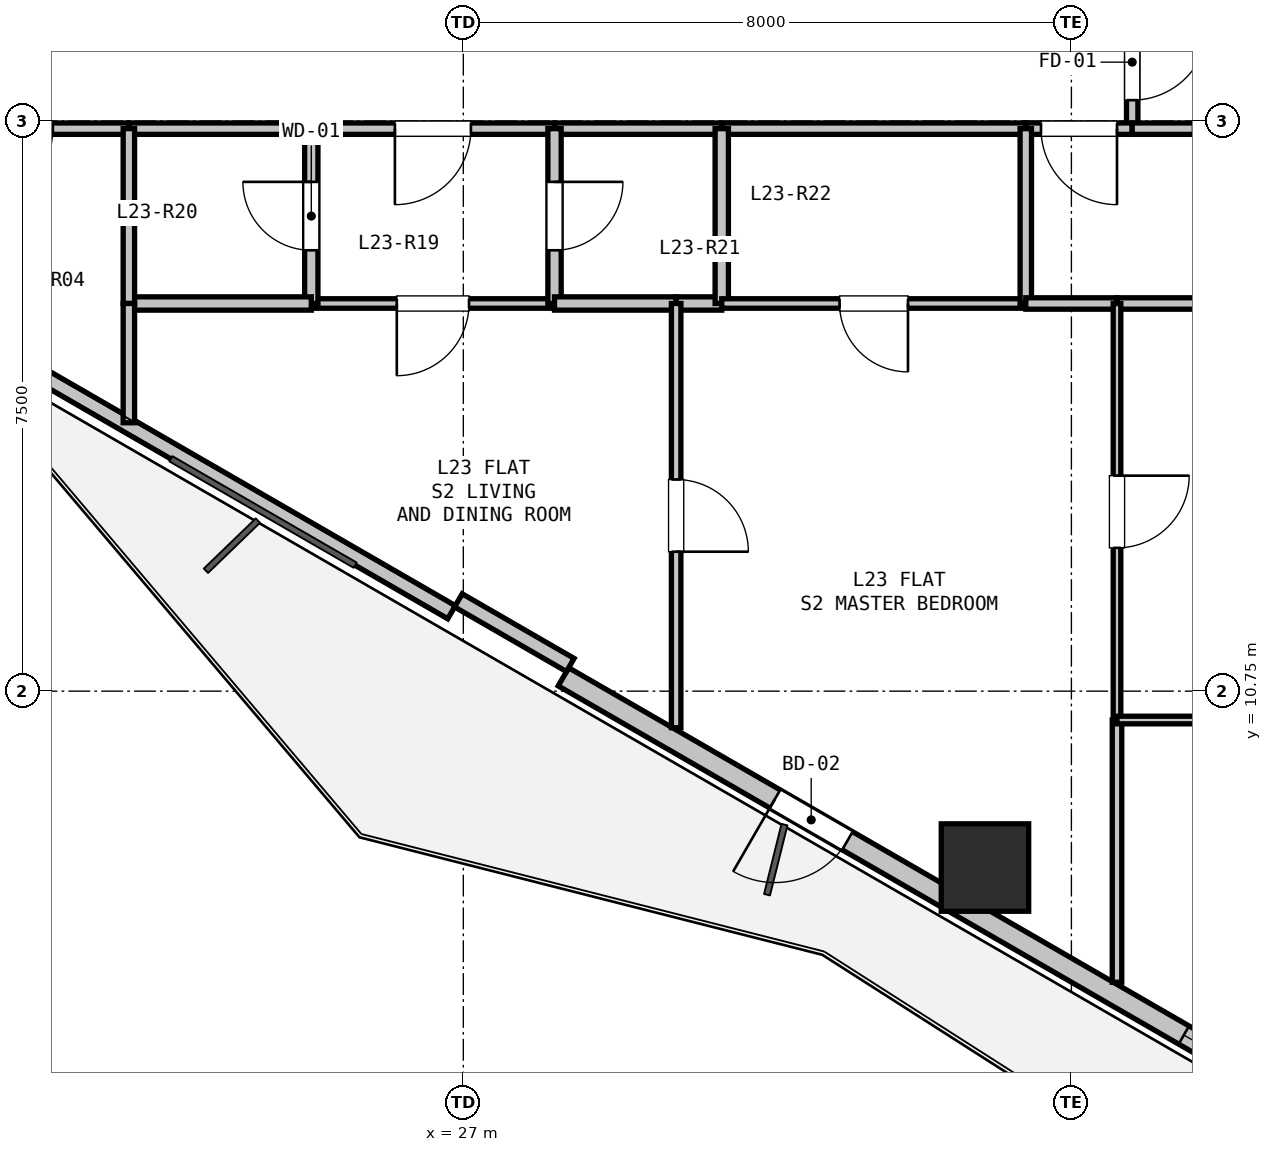
"""IFC4 building model, lengths in metres.
Left out: names, types, materials, properties, quantities, classifications, styles, units other than length and angle.
Written with IfcOpenShell. Run it as: python <this file> out.ifc"""

import sys

from ifc_helpers import new_model, si_unit, direction, frame, frame_2d, origin, origin_2d, place, context, subcontext, project, spatial, rectangle, hollow_rectangle, extrude, element, fill, save


model = new_model("IFC4")
c1 = context("Model", 3, precision=1e-05, world=origin(), true_north=direction((0.0, 1.0)))
c2 = subcontext(c1, "Body", "Model", "MODEL_VIEW")
j1 = project(units=[si_unit("LENGTHUNIT", "METRE"), si_unit("PLANEANGLEUNIT", "RADIAN")], contexts=[c1])
p1 = place(None, origin())
s1 = spatial("IfcSite", under=j1, at=p1, CompositionType="ELEMENT")
p2 = place(p1, origin())
s2 = spatial("IfcBuilding", under=s1, at=p2, CompositionType="ELEMENT")
p3 = place(p2, frame((0.0, 0.0, 86.7)))
s3 = spatial("IfcBuildingStorey", under=s2, at=p3, CompositionType="ELEMENT", Elevation=86.7)
p4 = place(p3, frame((33.863, 8.429, 0.0), z_axis=(0.0, 0.0, 1.0), x_axis=(1.0, 0.0, 0.0)))
e1 = element("IfcColumn", 1, at=p4, inside=s3, PredefinedType="COLUMN", context=c2, shape_type="SweptSolid", body=[
    extrude(hollow_rectangle(XDim=1.15, YDim=1.15, WallThickness=0.032, at=origin_2d()), origin(), (0.0, 0.0, 1.0), 3.3),
])
p5 = place(p3, frame((38.649, 4.973, 0.0), z_axis=(0.0, 0.0, 1.0), x_axis=(-0.866023023012, 0.500004123596, 0.0)))
e2 = element("IfcWall", 2, at=p5, inside=s3, PredefinedType="SOLIDWALL", context=c2, shape_type="SweptSolid", body=[
    extrude(rectangle(XDim=11.93, YDim=0.275, at=frame_2d((5.965, 0.0))), origin(), (0.0, 0.0, 1.0), 2.67),
])
p6 = place(p5, frame((7.616, 0.0, 0.0)))
e3 = element("IfcOpeningElement", 3, at=p6, cuts=e2, PredefinedType="OPENING", context=c2, shape_type="SweptSolid", body=[
    extrude(rectangle(XDim=1.1, YDim=2.1, at=frame_2d((0.55, 1.05))), frame((0.0, 0.147, 0.0), z_axis=(0.0, -1.0, 0.0), x_axis=(1.0, 0.0, 0.0)), (0.0, 0.0, 1.0), 0.295),
])
p7 = place(p5, frame((1.305, 0.0, 0.9)))
e4 = element("IfcOpeningElement", 4, at=p7, cuts=e2, PredefinedType="OPENING", context=c2, shape_type="SweptSolid", body=[
    extrude(rectangle(XDim=1.2, YDim=1.4, at=frame_2d((0.6, 0.7))), frame((0.0, 0.147, 0.0), z_axis=(0.0, -1.0, 0.0), x_axis=(1.0, 0.0, 0.0)), (0.0, 0.0, 1.0), 0.295),
])
p8 = place(p3, frame((26.845, 11.788, 0.0), z_axis=(0.0, 0.0, 1.0), x_axis=(-0.866027010039, 0.499997217876, 0.0)))
e5 = element("IfcWall", 5, at=p8, inside=s3, PredefinedType="PARAPET", context=c2, shape_type="SweptSolid", body=[
    extrude(rectangle(XDim=11.229, YDim=0.2, at=frame_2d((5.615, 0.0))), origin(), (0.0, 0.0, 1.0), 0.2),
])
p9 = place(p3, frame((28.407, 11.094, 0.0), z_axis=(0.0, 0.0, 1.0), x_axis=(-0.86605165483, 0.499954529098, 0.0)))
e6 = element("IfcWall", 6, at=p9, inside=s3, PredefinedType="PARAPET", context=c2, shape_type="SweptSolid", body=[
    extrude(rectangle(XDim=1.7, YDim=0.2, at=frame_2d((0.85, 0.0))), origin(), (0.0, 0.0, 1.0), 2.67),
])
p10 = place(p3, frame((35.8, 19.9, 0.0), z_axis=(0.0, 0.0, 1.0), x_axis=(0.0, -1.0, 0.0)))
e7 = element("IfcWall", 7, at=p10, inside=s3, PredefinedType="PARTITIONING", context=c2, shape_type="SweptSolid", body=[
    extrude(rectangle(XDim=1.75, YDim=0.15, at=frame_2d((0.875, 0.0))), origin(), (0.0, 0.0, 1.0), 3.05),
])
p11 = place(p10, frame((0.375, 0.0, 0.0)))
e8 = element("IfcOpeningElement", 8, at=p11, cuts=e7, PredefinedType="OPENING", context=c2, shape_type="SweptSolid", body=[
    extrude(rectangle(XDim=1.0, YDim=2.15, at=frame_2d((0.5, 1.075))), frame((0.0, 0.085, 0.0), z_axis=(0.0, -1.0, 0.0), x_axis=(1.0, 0.0, 0.0)), (0.0, 0.0, 1.0), 0.17),
])
p12 = place(p3, frame((35.8, 18.15, 0.0), z_axis=(0.0, 0.0, 1.0), x_axis=(-1.0, 0.0, 0.0)))
e9 = element("IfcWall", 9, at=p12, inside=s3, PredefinedType="PARTITIONING", context=c2, shape_type="SweptSolid", body=[
    extrude(rectangle(XDim=1.4, YDim=0.15, at=frame_2d((0.7, 0.0))), origin(), (0.0, 0.0, 1.0), 3.05),
])
p13 = place(p12, frame((0.2, 0.0, 0.0)))
e10 = element("IfcOpeningElement", 10, at=p13, cuts=e9, PredefinedType="OPENING", context=c2, shape_type="SweptSolid", body=[
    extrude(rectangle(XDim=1.0, YDim=2.15, at=frame_2d((0.5, 1.075))), frame((0.0, 0.085, 0.0), z_axis=(0.0, -1.0, 0.0), x_axis=(1.0, 0.0, 0.0)), (0.0, 0.0, 1.0), 0.17),
])
p14 = place(p3, frame((34.4, 18.15, 0.0), z_axis=(0.0, 0.0, 1.0), x_axis=(-1.0, 0.0, 0.0)))
e11 = element("IfcWall", 11, at=p14, inside=s3, PredefinedType="PARTITIONING", context=c2, shape_type="SweptSolid", body=[
    extrude(rectangle(XDim=4.0, YDim=0.15, at=frame_2d((2.0, 0.0))), origin(), (0.0, 0.0, 1.0), 3.05),
])
p15 = place(p3, frame((30.4, 18.15, 0.0), z_axis=(0.0, 0.0, 1.0), x_axis=(-1.0, 0.0, 0.0)))
e12 = element("IfcWall", 12, at=p15, inside=s3, PredefinedType="PARTITIONING", context=c2, shape_type="SweptSolid", body=[
    extrude(rectangle(XDim=2.2, YDim=0.15, at=frame_2d((1.1, 0.0))), origin(), (0.0, 0.0, 1.0), 3.05),
])
p16 = place(p3, frame((28.2, 18.15, 0.0), z_axis=(0.0, 0.0, 1.0), x_axis=(-1.0, 0.0, 0.0)))
e13 = element("IfcWall", 13, at=p16, inside=s3, PredefinedType="PARTITIONING", context=c2, shape_type="SweptSolid", body=[
    extrude(rectangle(XDim=3.2, YDim=0.15, at=frame_2d((1.6, 0.0))), origin(), (0.0, 0.0, 1.0), 3.05),
])
p17 = place(p16, frame((1.1, 0.0, 0.0)))
e14 = element("IfcOpeningElement", 14, at=p17, cuts=e13, PredefinedType="OPENING", context=c2, shape_type="SweptSolid", body=[
    extrude(rectangle(XDim=1.0, YDim=2.15, at=frame_2d((0.5, 1.075))), frame((0.0, 0.085, 0.0), z_axis=(0.0, -1.0, 0.0), x_axis=(1.0, 0.0, 0.0)), (0.0, 0.0, 1.0), 0.17),
])
p18 = place(p3, frame((25.0, 18.15, 0.0), z_axis=(0.0, 0.0, 1.0), x_axis=(-1.0, 0.0, 0.0)))
e15 = element("IfcWall", 15, at=p18, inside=s3, PredefinedType="PARTITIONING", context=c2, shape_type="SweptSolid", body=[
    extrude(rectangle(XDim=2.4, YDim=0.15, at=frame_2d((1.2, 0.0))), origin(), (0.0, 0.0, 1.0), 2.423),
])
p19 = place(p3, frame((22.6, 18.15, 0.0), z_axis=(0.0, 0.0, 1.0), x_axis=(-1.0, 0.0, 0.0)))
e16 = element("IfcWall", 16, at=p19, inside=s3, PredefinedType="PARTITIONING", context=c2, shape_type="SweptSolid", body=[
    extrude(rectangle(XDim=3.0, YDim=0.15, at=frame_2d((1.5, 0.0))), origin(), (0.0, 0.0, 1.0), 3.05),
])
p20 = place(p19, frame((1.0, 0.0, 0.0)))
e17 = element("IfcOpeningElement", 17, at=p20, cuts=e16, PredefinedType="OPENING", context=c2, shape_type="SweptSolid", body=[
    extrude(rectangle(XDim=1.0, YDim=2.15, at=frame_2d((0.5, 1.075))), frame((0.0, 0.085, 0.0), z_axis=(0.0, -1.0, 0.0), x_axis=(1.0, 0.0, 0.0)), (0.0, 0.0, 1.0), 0.17),
])
p21 = place(p3, frame((38.4, 18.15, 0.0), z_axis=(0.0, 0.0, 1.0), x_axis=(-1.0, 0.0, 0.0)))
e18 = element("IfcWall", 18, at=p21, inside=s3, PredefinedType="PARTITIONING", context=c2, shape_type="SweptSolid", body=[
    extrude(rectangle(XDim=2.6, YDim=0.15, at=frame_2d((1.3, 0.0))), origin(), (0.0, 0.0, 1.0), 2.423),
])
p22 = place(p21, frame((0.8, 0.0, 0.0)))
e19 = element("IfcOpeningElement", 19, at=p22, cuts=e18, PredefinedType="OPENING", context=c2, shape_type="SweptSolid", body=[
    extrude(rectangle(XDim=1.0, YDim=2.15, at=frame_2d((0.5, 1.075))), frame((0.0, 0.085, 0.0), z_axis=(0.0, -1.0, 0.0), x_axis=(1.0, 0.0, 0.0)), (0.0, 0.0, 1.0), 0.17),
])
p23 = place(p3, frame((28.2, 15.85, 0.0), z_axis=(0.0, 0.0, 1.0), x_axis=(-1.0, 0.0, 0.0)))
e20 = element("IfcWall", 20, at=p23, inside=s3, PredefinedType="PARTITIONING", context=c2, shape_type="SweptSolid", body=[
    extrude(rectangle(XDim=3.2, YDim=0.125, at=frame_2d((1.6, 0.0))), origin(), (0.0, 0.0, 1.0), 2.423),
])
p24 = place(p23, frame((1.125, 0.0, 0.0)))
e21 = element("IfcOpeningElement", 21, at=p24, cuts=e20, PredefinedType="OPENING", context=c2, shape_type="SweptSolid", body=[
    extrude(rectangle(XDim=0.95, YDim=2.1, at=frame_2d((0.475, 1.05))), frame((0.0, 0.073, 0.0), z_axis=(0.0, -1.0, 0.0), x_axis=(1.0, 0.0, 0.0)), (0.0, 0.0, 1.0), 0.145),
])
p25 = place(p3, frame((25.0, 15.85, 0.0), z_axis=(0.0, 0.0, 1.0), x_axis=(0.0, 1.0, 0.0)))
e22 = element("IfcWall", 22, at=p25, inside=s3, PredefinedType="PLUMBINGWALL", context=c2, shape_type="SweptSolid", body=[
    extrude(rectangle(XDim=2.3, YDim=0.175, at=frame_2d((1.15, 0.0))), origin(), (0.0, 0.0, 1.0), 2.423),
])
p26 = place(p25, frame((0.7, 0.0, 0.0)))
e23 = element("IfcOpeningElement", 23, at=p26, cuts=e22, PredefinedType="OPENING", context=c2, shape_type="SweptSolid", body=[
    extrude(rectangle(XDim=0.9, YDim=2.1, at=frame_2d((0.45, 1.05))), frame((0.0, 0.097, 0.0), z_axis=(0.0, -1.0, 0.0), x_axis=(1.0, 0.0, 0.0)), (0.0, 0.0, 1.0), 0.195),
])
p27 = place(p3, frame((28.2, 18.15, 0.0), z_axis=(0.0, 0.0, 1.0), x_axis=(0.0, -1.0, 0.0)))
e24 = element("IfcWall", 24, at=p27, inside=s3, PredefinedType="PLUMBINGWALL", context=c2, shape_type="SweptSolid", body=[
    extrude(rectangle(XDim=2.3, YDim=0.175, at=frame_2d((1.15, 0.0))), origin(), (0.0, 0.0, 1.0), 3.05),
])
p28 = place(p27, frame((0.7, 0.0, 0.0)))
e25 = element("IfcOpeningElement", 25, at=p28, cuts=e24, PredefinedType="OPENING", context=c2, shape_type="SweptSolid", body=[
    extrude(rectangle(XDim=0.9, YDim=2.1, at=frame_2d((0.45, 1.05))), frame((0.0, 0.097, 0.0), z_axis=(0.0, -1.0, 0.0), x_axis=(1.0, 0.0, 0.0)), (0.0, 0.0, 1.0), 0.195),
])
p29 = place(p3, frame((25.0, 15.85, 0.0), z_axis=(0.0, 0.0, 1.0), x_axis=(-1.0, 0.0, 0.0)))
e26 = element("IfcWall", 26, at=p29, inside=s3, PredefinedType="PLUMBINGWALL", context=c2, shape_type="SweptSolid", body=[
    extrude(rectangle(XDim=2.4, YDim=0.175, at=frame_2d((1.2, 0.0))), origin(), (0.0, 0.0, 1.0), 3.05),
])
p30 = place(p3, frame((22.6, 15.85, 0.0), z_axis=(0.0, 0.0, 1.0), x_axis=(0.0, 1.0, 0.0)))
e27 = element("IfcWall", 27, at=p30, inside=s3, PredefinedType="PARTITIONING", context=c2, shape_type="SweptSolid", body=[
    extrude(rectangle(XDim=2.3, YDim=0.15, at=frame_2d((1.15, 0.0))), origin(), (0.0, 0.0, 1.0), 3.05),
])
p31 = place(p3, frame((30.4, 15.85, 0.0), z_axis=(0.0, 0.0, 1.0), x_axis=(-1.0, 0.0, 0.0)))
e28 = element("IfcWall", 28, at=p31, inside=s3, PredefinedType="PLUMBINGWALL", context=c2, shape_type="SweptSolid", body=[
    extrude(rectangle(XDim=0.6, YDim=0.175, at=frame_2d((0.3, 0.0))), origin(), (0.0, 0.0, 1.0), 3.05),
])
p32 = place(p3, frame((29.8, 15.85, 0.0), z_axis=(0.0, 0.0, 1.0), x_axis=(-1.0, 0.0, 0.0)))
e29 = element("IfcWall", 29, at=p32, inside=s3, PredefinedType="PLUMBINGWALL", context=c2, shape_type="SweptSolid", body=[
    extrude(rectangle(XDim=1.6, YDim=0.175, at=frame_2d((0.8, 0.0))), origin(), (0.0, 0.0, 1.0), 3.05),
])
p33 = place(p3, frame((30.4, 18.15, 0.0), z_axis=(0.0, 0.0, 1.0), x_axis=(0.0, -1.0, 0.0)))
e30 = element("IfcWall", 30, at=p33, inside=s3, PredefinedType="PLUMBINGWALL", context=c2, shape_type="SweptSolid", body=[
    extrude(rectangle(XDim=2.3, YDim=0.175, at=frame_2d((1.15, 0.0))), origin(), (0.0, 0.0, 1.0), 3.05),
])
p34 = place(p3, frame((34.4, 15.85, 0.0), z_axis=(0.0, 0.0, 1.0), x_axis=(-1.0, 0.0, 0.0)))
e31 = element("IfcWall", 31, at=p34, inside=s3, PredefinedType="PARTITIONING", context=c2, shape_type="SweptSolid", body=[
    extrude(rectangle(XDim=4.0, YDim=0.125, at=frame_2d((2.0, 0.0))), origin(), (0.0, 0.0, 1.0), 3.05),
])
p35 = place(p34, frame((1.55, 0.0, 0.0)))
e32 = element("IfcOpeningElement", 32, at=p35, cuts=e31, PredefinedType="OPENING", context=c2, shape_type="SweptSolid", body=[
    extrude(rectangle(XDim=0.9, YDim=2.1, at=frame_2d((0.45, 1.05))), frame((0.0, 0.073, 0.0), z_axis=(0.0, -1.0, 0.0), x_axis=(1.0, 0.0, 0.0)), (0.0, 0.0, 1.0), 0.145),
])
p36 = place(p3, frame((34.4, 18.15, 0.0), z_axis=(0.0, 0.0, 1.0), x_axis=(0.0, -1.0, 0.0)))
e33 = element("IfcWall", 33, at=p36, inside=s3, PredefinedType="PARTITIONING", context=c2, shape_type="SweptSolid", body=[
    extrude(rectangle(XDim=2.3, YDim=0.15, at=frame_2d((1.15, 0.0))), origin(), (0.0, 0.0, 1.0), 3.05),
])
p37 = place(p3, frame((42.873, 15.85, 0.0), z_axis=(0.0, 0.0, 1.0), x_axis=(-1.0, 0.0, 0.0)))
e34 = element("IfcWall", 34, at=p37, inside=s3, PredefinedType="PARTITIONING", context=c2, shape_type="SweptSolid", body=[
    extrude(rectangle(XDim=7.273, YDim=0.15, at=frame_2d((3.636, 0.0))), origin(), (0.0, 0.0, 1.0), 2.365),
])
p38 = place(p3, frame((35.6, 15.85, 0.0), z_axis=(0.0, 0.0, 1.0), x_axis=(-1.0, 0.0, 0.0)))
e35 = element("IfcWall", 35, at=p38, inside=s3, PredefinedType="PARTITIONING", context=c2, shape_type="SweptSolid", body=[
    extrude(rectangle(XDim=1.2, YDim=0.15, at=frame_2d((0.6, 0.0))), origin(), (0.0, 0.0, 1.0), 3.05),
])
p39 = place(p3, frame((22.6, 15.85, 0.0), z_axis=(0.0, 0.0, 1.0), x_axis=(0.0, -1.0, 0.0)))
e36 = element("IfcWall", 36, at=p39, inside=s3, PredefinedType="PARTITIONING", context=c2, shape_type="SweptSolid", body=[
    extrude(rectangle(XDim=1.569, YDim=0.15, at=frame_2d((0.785, 0.0))), origin(), (0.0, 0.0, 1.0), 2.365),
])
p40 = place(p3, frame((29.8, 15.85, 0.0), z_axis=(0.0, 0.0, 1.0), x_axis=(0.0, -1.0, 0.0)))
e37 = element("IfcWall", 37, at=p40, inside=s3, PredefinedType="PARTITIONING", context=c2, shape_type="SweptSolid", body=[
    extrude(rectangle(XDim=5.581, YDim=0.125, at=frame_2d((2.791, 0.0))), origin(), (0.0, 0.0, 1.0), 2.365),
])
p41 = place(p40, frame((2.315, 0.0, 0.0)))
e38 = element("IfcOpeningElement", 38, at=p41, cuts=e37, PredefinedType="OPENING", context=c2, shape_type="SweptSolid", body=[
    extrude(rectangle(XDim=0.95, YDim=2.1, at=frame_2d((0.475, 1.05))), frame((0.0, 0.073, 0.0), z_axis=(0.0, -1.0, 0.0), x_axis=(1.0, 0.0, 0.0)), (0.0, 0.0, 1.0), 0.145),
])
p42 = place(p3, frame((35.6, 15.85, 0.0), z_axis=(0.0, 0.0, 1.0), x_axis=(0.0, -1.0, 0.0)))
e39 = element("IfcWall", 39, at=p42, inside=s3, PredefinedType="PARTITIONING", context=c2, shape_type="SweptSolid", body=[
    extrude(rectangle(XDim=5.48, YDim=0.1, at=frame_2d((2.74, 0.0))), origin(), (0.0, 0.0, 1.0), 3.05),
])
p43 = place(p42, frame((2.265, 0.0, 0.0)))
e40 = element("IfcOpeningElement", 40, at=p43, cuts=e39, PredefinedType="OPENING", context=c2, shape_type="SweptSolid", body=[
    extrude(rectangle(XDim=0.95, YDim=2.1, at=frame_2d((0.475, 1.05))), frame((0.0, 0.06, 0.0), z_axis=(0.0, -1.0, 0.0), x_axis=(1.0, 0.0, 0.0)), (0.0, 0.0, 1.0), 0.12),
])
p44 = place(p3, frame((35.6, 10.37, 0.0), z_axis=(0.0, 0.0, 1.0), x_axis=(0.0, -1.0, 0.0)))
e41 = element("IfcWall", 41, at=p44, inside=s3, PredefinedType="PARTITIONING", context=c2, shape_type="SweptSolid", body=[
    extrude(rectangle(XDim=3.45, YDim=0.125, at=frame_2d((1.725, 0.0))), origin(), (0.0, 0.0, 1.0), 2.66),
])
p45 = place(p3, frame((35.6, 10.37, 0.0), z_axis=(0.0, 0.0, 1.0), x_axis=(1.0, 0.0, 0.0)))
e42 = element("IfcWall", 42, at=p45, inside=s3, PredefinedType="PARTITIONING", context=c2, shape_type="SweptSolid", body=[
    extrude(rectangle(XDim=7.273, YDim=0.1, at=frame_2d((3.636, 0.0))), origin(), (0.0, 0.0, 1.0), 2.423),
])
p46 = place(p45, frame((3.162, 0.0, 0.0)))
e43 = element("IfcOpeningElement", 43, at=p46, cuts=e42, PredefinedType="OPENING", context=c2, shape_type="SweptSolid", body=[
    extrude(rectangle(XDim=0.95, YDim=2.1, at=frame_2d((0.475, 1.05))), frame((0.0, 0.06, 0.0), z_axis=(0.0, -1.0, 0.0), x_axis=(1.0, 0.0, 0.0)), (0.0, 0.0, 1.0), 0.12),
])
p47 = place(p6, origin())
e44 = element("IfcDoor", 44, at=p47, inside=s3, OperationType="SINGLE_SWING_RIGHT", PredefinedType="DOOR", context=c2, shape_type="SweptSolid", body=[
    extrude(rectangle(XDim=1.1, YDim=2.1, at=frame_2d((0.55, 1.05))), frame((0.0, 0.025, 0.0), z_axis=(0.0, -1.0, 0.0), x_axis=(1.0, 0.0, 0.0)), (0.0, 0.0, 1.0), 0.05),
])
fill(e3, e44)
p48 = place(p7, origin())
e45 = element("IfcWindow", 45, at=p48, inside=s3, PartitioningType="SINGLE_PANEL", PredefinedType="WINDOW", context=c2, shape_type="SweptSolid", body=[
    extrude(rectangle(XDim=1.2, YDim=1.4, at=frame_2d((0.6, 0.7))), frame((0.0, 0.03, 0.0), z_axis=(0.0, -1.0, 0.0), x_axis=(1.0, 0.0, 0.0)), (0.0, 0.0, 1.0), 0.06),
])
fill(e4, e45)
p49 = place(p11, origin())
e46 = element("IfcDoor", 46, at=p49, inside=s3, OperationType="SINGLE_SWING_LEFT", PredefinedType="DOOR", context=c2, shape_type="SweptSolid", body=[
    extrude(rectangle(XDim=1.0, YDim=2.15, at=frame_2d((0.5, 1.075))), frame((0.0, 0.025, 0.0), z_axis=(0.0, -1.0, 0.0), x_axis=(1.0, 0.0, 0.0)), (0.0, 0.0, 1.0), 0.05),
])
fill(e8, e46)
p50 = place(p17, origin())
e47 = element("IfcDoor", 47, at=p50, inside=s3, OperationType="SINGLE_SWING_RIGHT", PredefinedType="DOOR", context=c2, shape_type="SweptSolid", body=[
    extrude(rectangle(XDim=1.0, YDim=2.15, at=frame_2d((0.5, 1.075))), frame((0.0, 0.025, 0.0), z_axis=(0.0, -1.0, 0.0), x_axis=(1.0, 0.0, 0.0)), (0.0, 0.0, 1.0), 0.05),
])
fill(e14, e47)
p51 = place(p13, origin())
e48 = element("IfcDoor", 48, at=p51, inside=s3, OperationType="SINGLE_SWING_LEFT", PredefinedType="DOOR", context=c2, shape_type="SweptSolid", body=[
    extrude(rectangle(XDim=1.0, YDim=2.15, at=frame_2d((0.5, 1.075))), frame((0.0, 0.025, 0.0), z_axis=(0.0, -1.0, 0.0), x_axis=(1.0, 0.0, 0.0)), (0.0, 0.0, 1.0), 0.05),
])
fill(e10, e48)
p52 = place(p22, origin())
e49 = element("IfcDoor", 49, at=p52, inside=s3, OperationType="SINGLE_SWING_LEFT", PredefinedType="DOOR", context=c2, shape_type="SweptSolid", body=[
    extrude(rectangle(XDim=1.0, YDim=2.15, at=frame_2d((0.5, 1.075))), frame((0.0, 0.025, 0.0), z_axis=(0.0, -1.0, 0.0), x_axis=(1.0, 0.0, 0.0)), (0.0, 0.0, 1.0), 0.05),
])
fill(e19, e49)
p53 = place(p26, origin())
e50 = element("IfcDoor", 50, at=p53, inside=s3, OperationType="SINGLE_SWING_RIGHT", PredefinedType="DOOR", context=c2, shape_type="SweptSolid", body=[
    extrude(rectangle(XDim=0.9, YDim=2.1, at=frame_2d((0.45, 1.05))), frame((0.0, 0.025, 0.0), z_axis=(0.0, -1.0, 0.0), x_axis=(1.0, 0.0, 0.0)), (0.0, 0.0, 1.0), 0.05),
])
fill(e23, e50)
p54 = place(p28, origin())
e51 = element("IfcDoor", 51, at=p54, inside=s3, OperationType="SINGLE_SWING_LEFT", PredefinedType="DOOR", context=c2, shape_type="SweptSolid", body=[
    extrude(rectangle(XDim=0.9, YDim=2.1, at=frame_2d((0.45, 1.05))), frame((0.0, 0.025, 0.0), z_axis=(0.0, -1.0, 0.0), x_axis=(1.0, 0.0, 0.0)), (0.0, 0.0, 1.0), 0.05),
])
fill(e25, e51)
p55 = place(p24, origin())
e52 = element("IfcDoor", 52, at=p55, inside=s3, OperationType="SINGLE_SWING_RIGHT", PredefinedType="DOOR", context=c2, shape_type="SweptSolid", body=[
    extrude(rectangle(XDim=0.95, YDim=2.1, at=frame_2d((0.475, 1.05))), frame((0.0, 0.025, 0.0), z_axis=(0.0, -1.0, 0.0), x_axis=(1.0, 0.0, 0.0)), (0.0, 0.0, 1.0), 0.05),
])
fill(e21, e52)
p56 = place(p41, origin())
e53 = element("IfcDoor", 53, at=p56, inside=s3, OperationType="SINGLE_SWING_RIGHT", PredefinedType="DOOR", context=c2, shape_type="SweptSolid", body=[
    extrude(rectangle(XDim=0.95, YDim=2.1, at=frame_2d((0.475, 1.05))), frame((0.0, 0.025, 0.0), z_axis=(0.0, -1.0, 0.0), x_axis=(1.0, 0.0, 0.0)), (0.0, 0.0, 1.0), 0.05),
])
fill(e38, e53)
p57 = place(p43, origin())
e54 = element("IfcDoor", 54, at=p57, inside=s3, OperationType="SINGLE_SWING_LEFT", PredefinedType="DOOR", context=c2, shape_type="SweptSolid", body=[
    extrude(rectangle(XDim=0.95, YDim=2.1, at=frame_2d((0.475, 1.05))), frame((0.0, 0.025, 0.0), z_axis=(0.0, -1.0, 0.0), x_axis=(1.0, 0.0, 0.0)), (0.0, 0.0, 1.0), 0.05),
])
fill(e40, e54)
p58 = place(p35, origin())
e55 = element("IfcDoor", 55, at=p58, inside=s3, OperationType="SINGLE_SWING_LEFT", PredefinedType="DOOR", context=c2, shape_type="SweptSolid", body=[
    extrude(rectangle(XDim=0.9, YDim=2.1, at=frame_2d((0.45, 1.05))), frame((0.0, 0.025, 0.0), z_axis=(0.0, -1.0, 0.0), x_axis=(1.0, 0.0, 0.0)), (0.0, 0.0, 1.0), 0.05),
])
fill(e32, e55)
save(model, sys.argv[1])
